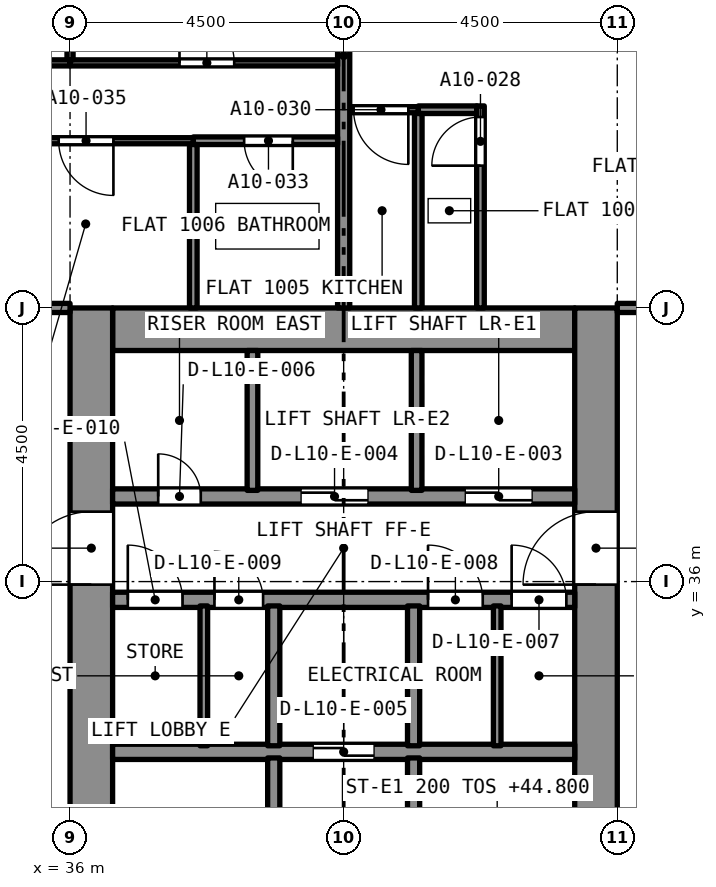
"""IFC4 building model, lengths in metres.
Left out: names, types, materials, properties, quantities, classifications, styles, units other than length and angle.
Written with IfcOpenShell. Run it as: python <this file> out.ifc"""

import sys

from ifc_helpers import new_model, si_unit, direction, frame, frame_2d, origin, place, context, subcontext, project, spatial, rectangle, extrude, element, fill, save


model = new_model("IFC4")
c1 = context("Model", 3, precision=1e-05, world=origin(), true_north=direction((0.0, 1.0)))
c2 = subcontext(c1, "Body", "Model", "MODEL_VIEW")
j1 = project(units=[si_unit("LENGTHUNIT", "METRE"), si_unit("PLANEANGLEUNIT", "RADIAN")], contexts=[c1])
p1 = place(None, origin())
s1 = spatial("IfcSite", under=j1, at=p1, CompositionType="ELEMENT")
p2 = place(p1, origin())
s2 = spatial("IfcBuilding", under=s1, at=p2, CompositionType="ELEMENT")
p3 = place(p2, frame((0.0, 0.0, 43.2)))
s3 = spatial("IfcBuildingStorey", under=s2, at=p3, CompositionType="ELEMENT", Elevation=43.2)
p4 = place(p3, frame((36.7, 40.15, 0.0), z_axis=(0.0, 0.0, 1.0), x_axis=(1.0, 0.0, 0.0)))
e1 = element("IfcWall", 1, at=p4, inside=s3, PredefinedType="SOLIDWALL", context=c2, shape_type="SweptSolid", body=[
    extrude(rectangle(XDim=7.6, YDim=0.7, at=frame_2d((3.8, 0.0))), origin(), (0.0, 0.0, 1.0), 3.2),
])
p5 = place(p3, frame((36.35, 27.0, 0.0), z_axis=(0.0, 0.0, 1.0), x_axis=(0.0, 1.0, 0.0)))
e2 = element("IfcWall", 2, at=p5, inside=s3, PredefinedType="SOLIDWALL", context=c2, shape_type="SweptSolid", body=[
    extrude(rectangle(XDim=13.5, YDim=0.7, at=frame_2d((6.75, 0.0))), origin(), (0.0, 0.0, 1.0), 3.2),
])
p6 = place(p5, frame((8.95, 0.0, 0.0)))
e3 = element("IfcOpeningElement", 3, at=p6, cuts=e2, PredefinedType="OPENING", context=c2, shape_type="SweptSolid", body=[
    extrude(rectangle(XDim=1.2, YDim=2.1, at=frame_2d((0.6, 1.05))), frame((0.0, 0.36, 0.0), z_axis=(0.0, -1.0, 0.0), x_axis=(1.0, 0.0, 0.0)), (0.0, 0.0, 1.0), 0.72),
])
p7 = place(p3, frame((44.65, 27.0, 0.0), z_axis=(0.0, 0.0, 1.0), x_axis=(0.0, 1.0, 0.0)))
e4 = element("IfcWall", 4, at=p7, inside=s3, PredefinedType="SOLIDWALL", context=c2, shape_type="SweptSolid", body=[
    extrude(rectangle(XDim=13.5, YDim=0.7, at=frame_2d((6.75, 0.0))), origin(), (0.0, 0.0, 1.0), 3.2),
])
p8 = place(p7, frame((8.95, 0.0, 0.0)))
e5 = element("IfcOpeningElement", 5, at=p8, cuts=e4, PredefinedType="OPENING", context=c2, shape_type="SweptSolid", body=[
    extrude(rectangle(XDim=1.2, YDim=2.1, at=frame_2d((0.6, 1.05))), frame((0.0, 0.36, 0.0), z_axis=(0.0, -1.0, 0.0), x_axis=(1.0, 0.0, 0.0)), (0.0, 0.0, 1.0), 0.72),
])
p9 = place(p3, frame((41.727, 43.76, 0.0), z_axis=(0.0, 0.0, 1.0), x_axis=(1.0, 0.0, 0.0)))
e6 = element("IfcWall", 6, at=p9, inside=s3, PredefinedType="PARTITIONING", context=c2, shape_type="SweptSolid", body=[
    extrude(rectangle(XDim=0.96, YDim=0.125, at=frame_2d((0.48, 0.0))), origin(), (0.0, 0.0, 1.0), 2.9),
])
p10 = place(p3, frame((42.75, 40.5, 0.0), z_axis=(0.0, 0.0, 1.0), x_axis=(0.0, 1.0, 0.0)))
e7 = element("IfcWall", 7, at=p10, inside=s3, PredefinedType="PARTITIONING", context=c2, shape_type="SweptSolid", body=[
    extrude(rectangle(XDim=3.323, YDim=0.125, at=frame_2d((1.661, 0.0))), origin(), (0.0, 0.0, 1.0), 2.9),
])
p11 = place(p10, frame((2.34, 0.0, 0.0)))
e8 = element("IfcOpeningElement", 8, at=p11, cuts=e7, PredefinedType="OPENING", context=c2, shape_type="SweptSolid", body=[
    extrude(rectangle(XDim=0.8, YDim=2.1, at=frame_2d((0.4, 1.05))), frame((0.0, 0.073, 0.0), z_axis=(0.0, -1.0, 0.0), x_axis=(1.0, 0.0, 0.0)), (0.0, 0.0, 1.0), 0.145),
])
p12 = place(p3, frame((41.727, 40.5, 0.0), z_axis=(0.0, 0.0, 1.0), x_axis=(0.0, 1.0, 0.0)))
e9 = element("IfcWall", 9, at=p12, inside=s3, PredefinedType="PARTITIONING", context=c2, shape_type="SweptSolid", body=[
    extrude(rectangle(XDim=3.198, YDim=0.125, at=frame_2d((1.599, 0.0))), origin(), (0.0, 0.0, 1.0), 2.9),
])
p13 = place(p3, frame((41.727, 43.76, 0.0), z_axis=(0.0, 0.0, 1.0), x_axis=(-1.0, 0.0, 0.0)))
e10 = element("IfcWall", 10, at=p13, inside=s3, PredefinedType="PARTITIONING", context=c2, shape_type="SweptSolid", body=[
    extrude(rectangle(XDim=1.127, YDim=0.1, at=frame_2d((0.563, 0.0))), origin(), (0.0, 0.0, 1.0), 2.9),
])
p14 = place(p13, frame((0.164, 0.0, 0.0)))
e11 = element("IfcOpeningElement", 11, at=p14, cuts=e10, PredefinedType="OPENING", context=c2, shape_type="SweptSolid", body=[
    extrude(rectangle(XDim=0.9, YDim=2.1, at=frame_2d((0.45, 1.05))), frame((0.0, 0.06, 0.0), z_axis=(0.0, -1.0, 0.0), x_axis=(1.0, 0.0, 0.0)), (0.0, 0.0, 1.0), 0.12),
])
p15 = place(p3, frame((45.0, 40.5, 0.0), z_axis=(0.0, 0.0, 1.0), x_axis=(1.0, 0.0, 0.0)))
e12 = element("IfcWall", 12, at=p15, inside=s3, PredefinedType="PARTITIONING", context=c2, shape_type="SweptSolid", body=[
    extrude(rectangle(XDim=3.8, YDim=0.15, at=frame_2d((1.9, 0.0))), origin(), (0.0, 0.0, 1.0), 2.9),
])
p16 = place(p15, frame((1.75, 0.0, 0.0)))
e13 = element("IfcOpeningElement", 13, at=p16, cuts=e12, PredefinedType="OPENING", context=c2, shape_type="SweptSolid", body=[
    extrude(rectangle(XDim=1.0, YDim=2.1, at=frame_2d((0.5, 1.05))), frame((0.0, 0.085, 0.0), z_axis=(0.0, -1.0, 0.0), x_axis=(1.0, 0.0, 0.0)), (0.0, 0.0, 1.0), 0.17),
])
p17 = place(p3, frame((40.5, 40.5, 0.0), z_axis=(0.0, 0.0, 1.0), x_axis=(0.0, 1.0, 0.0)))
e14 = element("IfcWall", 14, at=p17, inside=s3, PredefinedType="PARTITIONING", context=c2, shape_type="SweptSolid", body=[
    extrude(rectangle(XDim=8.3, YDim=0.2, at=frame_2d((4.15, 0.0))), origin(), (0.0, 0.0, 1.0), 2.9),
])
p18 = place(p3, frame((40.4, 43.25, 0.0), z_axis=(0.0, 0.0, 1.0), x_axis=(-1.0, 0.0, 0.0)))
e15 = element("IfcWall", 15, at=p18, inside=s3, PredefinedType="PARTITIONING", context=c2, shape_type="SweptSolid", body=[
    extrude(rectangle(XDim=2.373, YDim=0.125, at=frame_2d((1.187, 0.0))), origin(), (0.0, 0.0, 1.0), 2.9),
])
p19 = place(p18, frame((0.737, 0.0, 0.0)))
e16 = element("IfcOpeningElement", 16, at=p19, cuts=e15, PredefinedType="OPENING", context=c2, shape_type="SweptSolid", body=[
    extrude(rectangle(XDim=0.8, YDim=2.1, at=frame_2d((0.4, 1.05))), frame((0.0, 0.073, 0.0), z_axis=(0.0, -1.0, 0.0), x_axis=(1.0, 0.0, 0.0)), (0.0, 0.0, 1.0), 0.145),
])
p20 = place(p3, frame((38.027, 40.5, 0.0), z_axis=(0.0, 0.0, 1.0), x_axis=(0.0, 1.0, 0.0)))
e17 = element("IfcWall", 17, at=p20, inside=s3, PredefinedType="PARTITIONING", context=c2, shape_type="SweptSolid", body=[
    extrude(rectangle(XDim=2.688, YDim=0.125, at=frame_2d((1.344, 0.0))), origin(), (0.0, 0.0, 1.0), 2.9),
])
p21 = place(p3, frame((36.0, 44.53, 0.0), z_axis=(0.0, 0.0, 1.0), x_axis=(1.0, 0.0, 0.0)))
e18 = element("IfcWall", 18, at=p21, inside=s3, PredefinedType="PARTITIONING", context=c2, shape_type="SweptSolid", body=[
    extrude(rectangle(XDim=4.4, YDim=0.1, at=frame_2d((2.2, 0.0))), origin(), (0.0, 0.0, 1.0), 2.9),
])
p22 = place(p21, frame((1.8, 0.0, 0.0)))
e19 = element("IfcOpeningElement", 19, at=p22, cuts=e18, PredefinedType="OPENING", context=c2, shape_type="SweptSolid", body=[
    extrude(rectangle(XDim=0.9, YDim=2.1, at=frame_2d((0.45, 1.05))), frame((0.0, 0.06, 0.0), z_axis=(0.0, -1.0, 0.0), x_axis=(1.0, 0.0, 0.0)), (0.0, 0.0, 1.0), 0.12),
])
p23 = place(p3, frame((36.0, 44.58, 0.0), z_axis=(0.0, 0.0, 1.0), x_axis=(0.0, 1.0, 0.0)))
e20 = element("IfcWall", 20, at=p23, inside=s3, PredefinedType="PARTITIONING", context=c2, shape_type="SweptSolid", body=[
    extrude(rectangle(XDim=4.22, YDim=0.1, at=frame_2d((2.11, 0.0))), origin(), (0.0, 0.0, 1.0), 2.9),
])
p24 = place(p3, frame((38.027, 43.25, 0.0), z_axis=(0.0, 0.0, 1.0), x_axis=(-1.0, 0.0, 0.0)))
e21 = element("IfcWall", 21, at=p24, inside=s3, PredefinedType="PARTITIONING", context=c2, shape_type="SweptSolid", body=[
    extrude(rectangle(XDim=3.577, YDim=0.1, at=frame_2d((1.788, 0.0))), origin(), (0.0, 0.0, 1.0), 2.9),
])
p25 = place(p24, frame((1.313, 0.0, 0.0)))
e22 = element("IfcOpeningElement", 22, at=p25, cuts=e21, PredefinedType="OPENING", context=c2, shape_type="SweptSolid", body=[
    extrude(rectangle(XDim=0.9, YDim=2.1, at=frame_2d((0.45, 1.05))), frame((0.0, 0.06, 0.0), z_axis=(0.0, -1.0, 0.0), x_axis=(1.0, 0.0, 0.0)), (0.0, 0.0, 1.0), 0.12),
])
p26 = place(p3, frame((32.2, 44.53, 0.0), z_axis=(0.0, 0.0, 1.0), x_axis=(1.0, 0.0, 0.0)))
e23 = element("IfcWall", 23, at=p26, inside=s3, PredefinedType="PARTITIONING", context=c2, shape_type="SweptSolid", body=[
    extrude(rectangle(XDim=3.8, YDim=0.1, at=frame_2d((1.9, 0.0))), origin(), (0.0, 0.0, 1.0), 2.9),
])
p27 = place(p26, frame((1.05, 0.0, 0.0)))
e24 = element("IfcOpeningElement", 24, at=p27, cuts=e23, PredefinedType="OPENING", context=c2, shape_type="SweptSolid", body=[
    extrude(rectangle(XDim=1.0, YDim=2.1, at=frame_2d((0.5, 1.05))), frame((0.0, 0.06, 0.0), z_axis=(0.0, -1.0, 0.0), x_axis=(1.0, 0.0, 0.0)), (0.0, 0.0, 1.0), 0.12),
])
p28 = place(p3, frame((34.5, 40.5, 0.0), z_axis=(0.0, 0.0, 1.0), x_axis=(1.0, 0.0, 0.0)))
e25 = element("IfcWall", 25, at=p28, inside=s3, PredefinedType="PARTITIONING", context=c2, shape_type="SweptSolid", body=[
    extrude(rectangle(XDim=1.5, YDim=0.15, at=frame_2d((0.75, 0.0))), origin(), (0.0, 0.0, 1.0), 2.9),
])
p29 = place(p3, frame((36.7, 33.2, 0.0), z_axis=(0.0, 0.0, 1.0), x_axis=(1.0, 0.0, 0.0)))
e26 = element("IfcWall", 26, at=p29, inside=s3, PredefinedType="SOLIDWALL", context=c2, shape_type="SweptSolid", body=[
    extrude(rectangle(XDim=7.6, YDim=0.25, at=frame_2d((3.8, 0.0))), origin(), (0.0, 0.0, 1.0), 2.9),
])
p30 = place(p29, frame((3.3, 0.0, 0.0)))
e27 = element("IfcOpeningElement", 27, at=p30, cuts=e26, PredefinedType="OPENING", context=c2, shape_type="SweptSolid", body=[
    extrude(rectangle(XDim=1.0, YDim=2.1, at=frame_2d((0.5, 1.05))), frame((0.0, 0.135, 0.0), z_axis=(0.0, -1.0, 0.0), x_axis=(1.0, 0.0, 0.0)), (0.0, 0.0, 1.0), 0.27),
])
p31 = place(p3, frame((36.7, 35.7, 0.0), z_axis=(0.0, 0.0, 1.0), x_axis=(1.0, 0.0, 0.0)))
e28 = element("IfcWall", 28, at=p31, inside=s3, PredefinedType="SOLIDWALL", context=c2, shape_type="SweptSolid", body=[
    extrude(rectangle(XDim=7.6, YDim=0.25, at=frame_2d((3.8, 0.0))), origin(), (0.0, 0.0, 1.0), 2.9),
])
p32 = place(p31, frame((6.562, 0.0, 0.0)))
e29 = element("IfcOpeningElement", 29, at=p32, cuts=e28, PredefinedType="OPENING", context=c2, shape_type="SweptSolid", body=[
    extrude(rectangle(XDim=0.9, YDim=2.1, at=frame_2d((0.45, 1.05))), frame((0.0, 0.135, 0.0), z_axis=(0.0, -1.0, 0.0), x_axis=(1.0, 0.0, 0.0)), (0.0, 0.0, 1.0), 0.27),
])
p33 = place(p31, frame((5.188, 0.0, 0.0)))
e30 = element("IfcOpeningElement", 30, at=p33, cuts=e28, PredefinedType="OPENING", context=c2, shape_type="SweptSolid", body=[
    extrude(rectangle(XDim=0.9, YDim=2.1, at=frame_2d((0.45, 1.05))), frame((0.0, 0.135, 0.0), z_axis=(0.0, -1.0, 0.0), x_axis=(1.0, 0.0, 0.0)), (0.0, 0.0, 1.0), 0.27),
])
p34 = place(p31, frame((1.675, 0.0, 0.0)))
e31 = element("IfcOpeningElement", 31, at=p34, cuts=e28, PredefinedType="OPENING", context=c2, shape_type="SweptSolid", body=[
    extrude(rectangle(XDim=0.8, YDim=2.1, at=frame_2d((0.4, 1.05))), frame((0.0, 0.135, 0.0), z_axis=(0.0, -1.0, 0.0), x_axis=(1.0, 0.0, 0.0)), (0.0, 0.0, 1.0), 0.27),
])
p35 = place(p31, frame((0.25, 0.0, 0.0)))
e32 = element("IfcOpeningElement", 32, at=p35, cuts=e28, PredefinedType="OPENING", context=c2, shape_type="SweptSolid", body=[
    extrude(rectangle(XDim=0.9, YDim=2.1, at=frame_2d((0.45, 1.05))), frame((0.0, 0.135, 0.0), z_axis=(0.0, -1.0, 0.0), x_axis=(1.0, 0.0, 0.0)), (0.0, 0.0, 1.0), 0.27),
])
p36 = place(p3, frame((36.7, 37.4, 0.0), z_axis=(0.0, 0.0, 1.0), x_axis=(1.0, 0.0, 0.0)))
e33 = element("IfcWall", 33, at=p36, inside=s3, PredefinedType="SOLIDWALL", context=c2, shape_type="SweptSolid", body=[
    extrude(rectangle(XDim=7.6, YDim=0.25, at=frame_2d((3.8, 0.0))), origin(), (0.0, 0.0, 1.0), 2.9),
])
p37 = place(p36, frame((5.8, 0.0, 0.0)))
e34 = element("IfcOpeningElement", 34, at=p37, cuts=e33, PredefinedType="OPENING", context=c2, shape_type="SweptSolid", body=[
    extrude(rectangle(XDim=1.1, YDim=2.4, at=frame_2d((0.55, 1.2))), frame((0.0, 0.135, 0.0), z_axis=(0.0, -1.0, 0.0), x_axis=(1.0, 0.0, 0.0)), (0.0, 0.0, 1.0), 0.27),
])
p38 = place(p36, frame((3.1, 0.0, 0.0)))
e35 = element("IfcOpeningElement", 35, at=p38, cuts=e33, PredefinedType="OPENING", context=c2, shape_type="SweptSolid", body=[
    extrude(rectangle(XDim=1.1, YDim=2.4, at=frame_2d((0.55, 1.2))), frame((0.0, 0.135, 0.0), z_axis=(0.0, -1.0, 0.0), x_axis=(1.0, 0.0, 0.0)), (0.0, 0.0, 1.0), 0.27),
])
p39 = place(p36, frame((0.75, 0.0, 0.0)))
e36 = element("IfcOpeningElement", 36, at=p39, cuts=e33, PredefinedType="OPENING", context=c2, shape_type="SweptSolid", body=[
    extrude(rectangle(XDim=0.7, YDim=2.1, at=frame_2d((0.35, 1.05))), frame((0.0, 0.135, 0.0), z_axis=(0.0, -1.0, 0.0), x_axis=(1.0, 0.0, 0.0)), (0.0, 0.0, 1.0), 0.27),
])
p40 = place(p3, frame((41.65, 27.7, 0.0), z_axis=(0.0, 0.0, 1.0), x_axis=(0.0, 1.0, 0.0)))
e37 = element("IfcWall", 37, at=p40, inside=s3, PredefinedType="SOLIDWALL", context=c2, shape_type="SweptSolid", body=[
    extrude(rectangle(XDim=5.4, YDim=0.2, at=frame_2d((2.7, 0.0))), origin(), (0.0, 0.0, 1.0), 2.9),
])
p41 = place(p40, frame((0.2, 0.0, 0.0)))
e38 = element("IfcOpeningElement", 38, at=p41, cuts=e37, PredefinedType="OPENING", context=c2, shape_type="SweptSolid", body=[
    extrude(rectangle(XDim=0.9, YDim=2.1, at=frame_2d((0.45, 1.05))), frame((0.0, 0.11, 0.0), z_axis=(0.0, -1.0, 0.0), x_axis=(1.0, 0.0, 0.0)), (0.0, 0.0, 1.0), 0.22),
])
p42 = place(p3, frame((39.35, 27.7, 0.0), z_axis=(0.0, 0.0, 1.0), x_axis=(0.0, 1.0, 0.0)))
e39 = element("IfcWall", 39, at=p42, inside=s3, PredefinedType="SOLIDWALL", context=c2, shape_type="SweptSolid", body=[
    extrude(rectangle(XDim=5.4, YDim=0.2, at=frame_2d((2.7, 0.0))), origin(), (0.0, 0.0, 1.0), 2.9),
])
p43 = place(p42, frame((0.2, 0.0, 0.0)))
e40 = element("IfcOpeningElement", 40, at=p43, cuts=e39, PredefinedType="OPENING", context=c2, shape_type="SweptSolid", body=[
    extrude(rectangle(XDim=0.9, YDim=2.1, at=frame_2d((0.45, 1.05))), frame((0.0, 0.11, 0.0), z_axis=(0.0, -1.0, 0.0), x_axis=(1.0, 0.0, 0.0)), (0.0, 0.0, 1.0), 0.22),
])
for number, where, z_axis, x_axis in (
    (41, (41.65, 33.3, 0.0), (0.0, 0.0, 1.0), (0.0, 1.0, 0.0)),
    (42, (39.35, 33.3, 0.0), (0.0, 0.0, 1.0), (0.0, 1.0, 0.0)),
):
    element("IfcWall", number, at=place(p3, frame(where, z_axis=z_axis, x_axis=x_axis)), inside=s3, PredefinedType="SOLIDWALL", context=c2, shape_type="SweptSolid", body=[
        extrude(rectangle(XDim=2.3, YDim=0.2, at=frame_2d((1.15, 0.0))), origin(), (0.0, 0.0, 1.0), 2.9),
    ])
for number, where, z_axis, x_axis in (
    (43, (41.7, 37.5, 0.0), (0.0, 0.0, 1.0), (0.0, 1.0, 0.0)),
    (44, (39.0, 37.5, 0.0), (0.0, 0.0, 1.0), (0.0, 1.0, 0.0)),
):
    element("IfcWall", number, at=place(p3, frame(where, z_axis=z_axis, x_axis=x_axis)), inside=s3, PredefinedType="SOLIDWALL", context=c2, shape_type="SweptSolid", body=[
        extrude(rectangle(XDim=2.3, YDim=0.175, at=frame_2d((1.15, 0.0))), origin(), (0.0, 0.0, 1.0), 2.9),
    ])
for number, where, z_axis, x_axis in (
    (45, (43.025, 33.3, 0.0), (0.0, 0.0, 1.0), (0.0, 1.0, 0.0)),
    (46, (38.2, 33.3, 0.0), (0.0, 0.0, 1.0), (0.0, 1.0, 0.0)),
):
    element("IfcWall", number, at=place(p3, frame(where, z_axis=z_axis, x_axis=x_axis)), inside=s3, PredefinedType="PARTITIONING", context=c2, shape_type="SweptSolid", body=[
        extrude(rectangle(XDim=2.3, YDim=0.125, at=frame_2d((1.15, 0.0))), origin(), (0.0, 0.0, 1.0), 2.9),
    ])
p44 = place(p11, origin())
e47 = element("IfcDoor", 47, at=p44, inside=s3, OperationType="SINGLE_SWING_RIGHT", PredefinedType="DOOR", context=c2, shape_type="SweptSolid", body=[
    extrude(rectangle(XDim=0.8, YDim=2.1, at=frame_2d((0.4, 1.05))), frame((0.0, 0.025, 0.0), z_axis=(0.0, -1.0, 0.0), x_axis=(1.0, 0.0, 0.0)), (0.0, 0.0, 1.0), 0.05),
])
fill(e8, e47)
p45 = place(p14, origin())
e48 = element("IfcDoor", 48, at=p45, inside=s3, OperationType="SINGLE_SWING_RIGHT", PredefinedType="DOOR", context=c2, shape_type="SweptSolid", body=[
    extrude(rectangle(XDim=0.9, YDim=2.1, at=frame_2d((0.45, 1.05))), frame((0.0, 0.025, 0.0), z_axis=(0.0, -1.0, 0.0), x_axis=(1.0, 0.0, 0.0)), (0.0, 0.0, 1.0), 0.05),
])
fill(e11, e48)
p46 = place(p19, origin())
e49 = element("IfcDoor", 49, at=p46, inside=s3, OperationType="SINGLE_SWING_LEFT", PredefinedType="DOOR", context=c2, shape_type="SweptSolid", body=[
    extrude(rectangle(XDim=0.8, YDim=2.1, at=frame_2d((0.4, 1.05))), frame((0.0, 0.025, 0.0), z_axis=(0.0, -1.0, 0.0), x_axis=(1.0, 0.0, 0.0)), (0.0, 0.0, 1.0), 0.05),
])
fill(e16, e49)
p47 = place(p22, origin())
e50 = element("IfcDoor", 50, at=p47, inside=s3, OperationType="SINGLE_SWING_RIGHT", PredefinedType="DOOR", context=c2, shape_type="SweptSolid", body=[
    extrude(rectangle(XDim=0.9, YDim=2.1, at=frame_2d((0.45, 1.05))), frame((0.0, 0.025, 0.0), z_axis=(0.0, -1.0, 0.0), x_axis=(1.0, 0.0, 0.0)), (0.0, 0.0, 1.0), 0.05),
])
fill(e19, e50)
p48 = place(p25, origin())
e51 = element("IfcDoor", 51, at=p48, inside=s3, OperationType="SINGLE_SWING_LEFT", PredefinedType="DOOR", context=c2, shape_type="SweptSolid", body=[
    extrude(rectangle(XDim=0.9, YDim=2.1, at=frame_2d((0.45, 1.05))), frame((0.0, 0.025, 0.0), z_axis=(0.0, -1.0, 0.0), x_axis=(1.0, 0.0, 0.0)), (0.0, 0.0, 1.0), 0.05),
])
fill(e22, e51)
p49 = place(p37, origin())
e52 = element("IfcDoor", 52, at=p49, inside=s3, OperationType="SLIDING_TO_LEFT", PredefinedType="DOOR", context=c2, shape_type="SweptSolid", body=[
    extrude(rectangle(XDim=1.1, YDim=2.4, at=frame_2d((0.55, 1.2))), frame((0.0, 0.025, 0.0), z_axis=(0.0, -1.0, 0.0), x_axis=(1.0, 0.0, 0.0)), (0.0, 0.0, 1.0), 0.05),
])
fill(e34, e52)
p50 = place(p38, origin())
e53 = element("IfcDoor", 53, at=p50, inside=s3, OperationType="SLIDING_TO_LEFT", PredefinedType="DOOR", context=c2, shape_type="SweptSolid", body=[
    extrude(rectangle(XDim=1.1, YDim=2.4, at=frame_2d((0.55, 1.2))), frame((0.0, 0.025, 0.0), z_axis=(0.0, -1.0, 0.0), x_axis=(1.0, 0.0, 0.0)), (0.0, 0.0, 1.0), 0.05),
])
fill(e35, e53)
p51 = place(p30, origin())
e54 = element("IfcDoor", 54, at=p51, inside=s3, OperationType="SLIDING_TO_LEFT", PredefinedType="DOOR", context=c2, shape_type="SweptSolid", body=[
    extrude(rectangle(XDim=1.0, YDim=2.1, at=frame_2d((0.5, 1.05))), frame((0.0, 0.025, 0.0), z_axis=(0.0, -1.0, 0.0), x_axis=(1.0, 0.0, 0.0)), (0.0, 0.0, 1.0), 0.05),
])
fill(e27, e54)
p52 = place(p39, origin())
e55 = element("IfcDoor", 55, at=p52, inside=s3, OperationType="SINGLE_SWING_LEFT", PredefinedType="DOOR", context=c2, shape_type="SweptSolid", body=[
    extrude(rectangle(XDim=0.7, YDim=2.1, at=frame_2d((0.35, 1.05))), frame((0.0, 0.025, 0.0), z_axis=(0.0, -1.0, 0.0), x_axis=(1.0, 0.0, 0.0)), (0.0, 0.0, 1.0), 0.05),
])
fill(e36, e55)
p53 = place(p32, origin())
e56 = element("IfcDoor", 56, at=p53, inside=s3, OperationType="SINGLE_SWING_LEFT", PredefinedType="DOOR", context=c2, shape_type="SweptSolid", body=[
    extrude(rectangle(XDim=0.9, YDim=2.1, at=frame_2d((0.45, 1.05))), frame((0.0, 0.025, 0.0), z_axis=(0.0, -1.0, 0.0), x_axis=(1.0, 0.0, 0.0)), (0.0, 0.0, 1.0), 0.05),
])
fill(e29, e56)
p54 = place(p33, origin())
e57 = element("IfcDoor", 57, at=p54, inside=s3, OperationType="SINGLE_SWING_LEFT", PredefinedType="DOOR", context=c2, shape_type="SweptSolid", body=[
    extrude(rectangle(XDim=0.9, YDim=2.1, at=frame_2d((0.45, 1.05))), frame((0.0, 0.025, 0.0), z_axis=(0.0, -1.0, 0.0), x_axis=(1.0, 0.0, 0.0)), (0.0, 0.0, 1.0), 0.05),
])
fill(e30, e57)
p55 = place(p34, origin())
e58 = element("IfcDoor", 58, at=p55, inside=s3, OperationType="SINGLE_SWING_LEFT", PredefinedType="DOOR", context=c2, shape_type="SweptSolid", body=[
    extrude(rectangle(XDim=0.8, YDim=2.1, at=frame_2d((0.4, 1.05))), frame((0.0, 0.025, 0.0), z_axis=(0.0, -1.0, 0.0), x_axis=(1.0, 0.0, 0.0)), (0.0, 0.0, 1.0), 0.05),
])
fill(e31, e58)
p56 = place(p35, origin())
e59 = element("IfcDoor", 59, at=p56, inside=s3, OperationType="SINGLE_SWING_LEFT", PredefinedType="DOOR", context=c2, shape_type="SweptSolid", body=[
    extrude(rectangle(XDim=0.9, YDim=2.1, at=frame_2d((0.45, 1.05))), frame((0.0, 0.025, 0.0), z_axis=(0.0, -1.0, 0.0), x_axis=(1.0, 0.0, 0.0)), (0.0, 0.0, 1.0), 0.05),
])
fill(e32, e59)
p57 = place(p6, origin())
e60 = element("IfcDoor", 60, at=p57, inside=s3, OperationType="SINGLE_SWING_LEFT", PredefinedType="DOOR", context=c2, shape_type="SweptSolid", body=[
    extrude(rectangle(XDim=1.2, YDim=2.1, at=frame_2d((0.6, 1.05))), frame((0.0, 0.025, 0.0), z_axis=(0.0, -1.0, 0.0), x_axis=(1.0, 0.0, 0.0)), (0.0, 0.0, 1.0), 0.05),
])
fill(e3, e60)
p58 = place(p8, origin())
e61 = element("IfcDoor", 61, at=p58, inside=s3, OperationType="SINGLE_SWING_LEFT", PredefinedType="DOOR", context=c2, shape_type="SweptSolid", body=[
    extrude(rectangle(XDim=1.2, YDim=2.1, at=frame_2d((0.6, 1.05))), frame((0.0, 0.025, 0.0), z_axis=(0.0, -1.0, 0.0), x_axis=(1.0, 0.0, 0.0)), (0.0, 0.0, 1.0), 0.05),
])
fill(e5, e61)
save(model, sys.argv[1])
